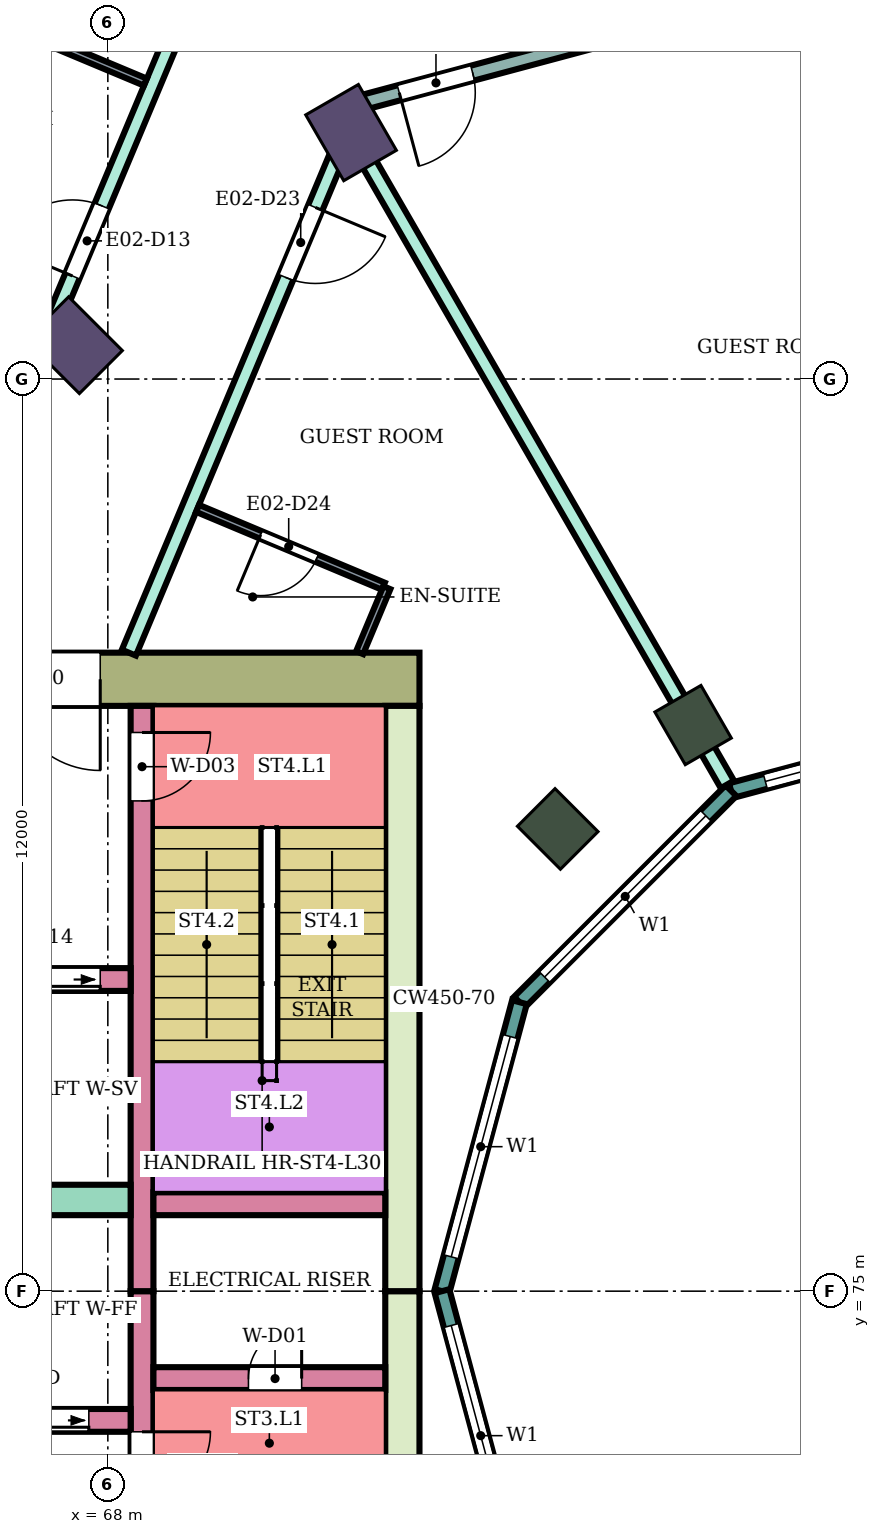
"""IFC4 building model, lengths in metres.
Left out: names, types, materials, properties, quantities, classifications, styles, units other than length and angle.
Written with IfcOpenShell. Run it as: python <this file> out.ifc"""

import sys

from ifc_helpers import new_model, si_unit, direction, frame, frame_2d, origin, origin_2d, place, context, subcontext, project, spatial, rectangle, extrude, element, fill, save


model = new_model("IFC4")
c1 = context("Model", 3, precision=1e-05, world=origin(), true_north=direction((0.0, 1.0)))
c2 = subcontext(c1, "Body", "Model", "MODEL_VIEW")
j1 = project(units=[si_unit("LENGTHUNIT", "METRE"), si_unit("PLANEANGLEUNIT", "RADIAN")], contexts=[c1])
p1 = place(None, origin())
s1 = spatial("IfcSite", under=j1, at=p1, CompositionType="ELEMENT")
p2 = place(p1, origin())
s2 = spatial("IfcBuilding", under=s1, at=p2, CompositionType="ELEMENT")
p3 = place(p2, frame((0.0, 0.0, 130.2)))
s3 = spatial("IfcBuildingStorey", under=s2, at=p3, CompositionType="ELEMENT", Elevation=130.2)
for number, where, z_axis, x_axis in (
    (1, (71.2, 90.242, 0.0), (0.0, 0.0, 1.0), (-0.5, 0.866, 0.0)),
    (2, (67.555, 87.445, 0.0), (0.0, 0.0, 1.0), (-0.707, 0.707, 0.0)),
):
    element("IfcColumn", number, at=place(p3, frame(where, z_axis=z_axis, x_axis=x_axis)), inside=s3, PredefinedType="COLUMN", context=c2, shape_type="SweptSolid", body=[
        extrude(rectangle(XDim=1.0, YDim=0.8, at=origin_2d()), origin(), (0.0, 0.0, 1.0), 3.9),
    ])
for number, where, z_axis, x_axis in (
    (3, (75.7, 82.448, 0.0), (0.0, 0.0, 1.0), (-0.5, 0.866, 0.0)),
    (4, (73.919, 81.081, 0.0), (0.0, 0.0, 1.0), (-0.707, 0.707, 0.0)),
):
    element("IfcColumn", number, at=place(p3, frame(where, z_axis=z_axis, x_axis=x_axis)), inside=s3, PredefinedType="COLUMN", context=c2, shape_type="SweptSolid", body=[
        extrude(rectangle(XDim=0.8, YDim=0.7, at=origin_2d()), origin(), (0.0, 0.0, 1.0), 3.9),
    ])
p4 = place(p3, frame((72.1, 83.05, 0.0), z_axis=(0.0, 0.0, 1.0), x_axis=(-1.0, 0.0, 0.0)))
e5 = element("IfcWall", 5, at=p4, inside=s3, PredefinedType="SHEAR", context=c2, shape_type="SweptSolid", body=[
    extrude(rectangle(XDim=14.8, YDim=0.7, at=frame_2d((7.4, 0.0))), origin(), (0.0, 0.0, 1.0), 3.58),
])
p5 = place(p4, frame((4.2, 0.0, 0.0)))
e6 = element("IfcOpeningElement", 6, at=p5, cuts=e5, PredefinedType="OPENING", context=c2, shape_type="SweptSolid", body=[
    extrude(rectangle(XDim=2.4, YDim=2.4, at=frame_2d((1.2, 1.2))), frame((0.0, 0.36, 0.0), z_axis=(0.0, -1.0, 0.0), x_axis=(1.0, 0.0, 0.0)), (0.0, 0.0, 1.0), 0.72),
])
for number, where, z_axis, x_axis in (
    (7, (71.875, 75.0, 0.0), (0.0, 0.0, 1.0), (0.0, -1.0, 0.0)),
    (8, (71.875, 82.7, 0.0), (0.0, 0.0, 1.0), (0.0, -1.0, 0.0)),
):
    element("IfcWall", number, at=place(p3, frame(where, z_axis=z_axis, x_axis=x_axis)), inside=s3, PredefinedType="SHEAR", context=c2, shape_type="SweptSolid", body=[
        extrude(rectangle(XDim=7.7, YDim=0.45, at=frame_2d((3.85, 0.0))), origin(), (0.0, 0.0, 1.0), 3.58),
    ])
p6 = place(p3, frame((68.45, 75.0, 0.0), z_axis=(0.0, 0.0, 1.0), x_axis=(0.0, -1.0, 0.0)))
e9 = element("IfcWall", 9, at=p6, inside=s3, PredefinedType="SHEAR", context=c2, shape_type="SweptSolid", body=[
    extrude(rectangle(XDim=7.7, YDim=0.3, at=frame_2d((3.85, 0.0))), origin(), (0.0, 0.0, 1.0), 3.58),
])
p7 = place(p6, frame((1.85, 0.0, 0.0)))
e10 = element("IfcOpeningElement", 10, at=p7, cuts=e9, PredefinedType="OPENING", context=c2, shape_type="SweptSolid", body=[
    extrude(rectangle(XDim=0.9, YDim=2.1, at=frame_2d((0.45, 1.05))), frame((0.0, 0.16, 0.0), z_axis=(0.0, -1.0, 0.0), x_axis=(1.0, 0.0, 0.0)), (0.0, 0.0, 1.0), 0.32),
])
p8 = place(p3, frame((68.45, 82.7, 0.0), z_axis=(0.0, 0.0, 1.0), x_axis=(0.0, -1.0, 0.0)))
e11 = element("IfcWall", 11, at=p8, inside=s3, PredefinedType="SHEAR", context=c2, shape_type="SweptSolid", body=[
    extrude(rectangle(XDim=7.7, YDim=0.3, at=frame_2d((3.85, 0.0))), origin(), (0.0, 0.0, 1.0), 3.58),
])
p9 = place(p8, frame((0.35, 0.0, 0.0)))
e12 = element("IfcOpeningElement", 12, at=p9, cuts=e11, PredefinedType="OPENING", context=c2, shape_type="SweptSolid", body=[
    extrude(rectangle(XDim=0.9, YDim=2.1, at=frame_2d((0.45, 1.05))), frame((0.0, 0.16, 0.0), z_axis=(0.0, -1.0, 0.0), x_axis=(1.0, 0.0, 0.0)), (0.0, 0.0, 1.0), 0.32),
])
p10 = place(p3, frame((71.65, 73.85, 0.0), z_axis=(0.0, 0.0, 1.0), x_axis=(-1.0, 0.0, 0.0)))
e13 = element("IfcWall", 13, at=p10, inside=s3, PredefinedType="SHEAR", context=c2, shape_type="SweptSolid", body=[
    extrude(rectangle(XDim=3.05, YDim=0.3, at=frame_2d((1.525, 0.0))), origin(), (0.0, 0.0, 1.0), 3.58),
])
p11 = place(p10, frame((1.1, 0.0, 0.0)))
e14 = element("IfcOpeningElement", 14, at=p11, cuts=e13, PredefinedType="OPENING", context=c2, shape_type="SweptSolid", body=[
    extrude(rectangle(XDim=0.7, YDim=2.0, at=frame_2d((0.35, 1.0))), frame((0.0, 0.16, 0.0), z_axis=(0.0, -1.0, 0.0), x_axis=(1.0, 0.0, 0.0)), (0.0, 0.0, 1.0), 0.32),
])
p12 = place(p3, frame((71.65, 76.15, 0.0), z_axis=(0.0, 0.0, 1.0), x_axis=(-1.0, 0.0, 0.0)))
e15 = element("IfcWall", 15, at=p12, inside=s3, PredefinedType="SHEAR", context=c2, shape_type="SweptSolid", body=[
    extrude(rectangle(XDim=3.05, YDim=0.3, at=frame_2d((1.525, 0.0))), origin(), (0.0, 0.0, 1.0), 3.58),
])
p13 = place(p3, frame((68.3, 73.3, 0.0), z_axis=(0.0, 0.0, 1.0), x_axis=(-1.0, 0.0, 0.0)))
e16 = element("IfcWall", 16, at=p13, inside=s3, PredefinedType="SHEAR", context=c2, shape_type="SweptSolid", body=[
    extrude(rectangle(XDim=11.0, YDim=0.3, at=frame_2d((5.5, 0.0))), origin(), (0.0, 0.0, 1.0), 3.58),
])
p14 = place(p13, frame((0.55, 0.0, 0.0)))
e17 = element("IfcOpeningElement", 17, at=p14, cuts=e16, PredefinedType="OPENING", context=c2, shape_type="SweptSolid", body=[
    extrude(rectangle(XDim=1.1, YDim=2.1, at=frame_2d((0.55, 1.05))), frame((0.0, 0.16, 0.0), z_axis=(0.0, -1.0, 0.0), x_axis=(1.0, 0.0, 0.0)), (0.0, 0.0, 1.0), 0.32),
])
p15 = place(p13, frame((8.1, 0.0, 0.0)))
e18 = element("IfcOpeningElement", 18, at=p15, cuts=e16, PredefinedType="OPENING", context=c2, shape_type="SweptSolid", body=[
    extrude(rectangle(XDim=1.0, YDim=2.1, at=frame_2d((0.5, 1.05))), frame((0.0, 0.16, 0.0), z_axis=(0.0, -1.0, 0.0), x_axis=(1.0, 0.0, 0.0)), (0.0, 0.0, 1.0), 0.32),
])
p16 = place(p3, frame((68.3, 76.2, 0.0), z_axis=(0.0, 0.0, 1.0), x_axis=(-1.0, 0.0, 0.0)))
e19 = element("IfcWall", 19, at=p16, inside=s3, PredefinedType="SHEAR", context=c2, shape_type="SweptSolid", body=[
    extrude(rectangle(XDim=11.0, YDim=0.4, at=frame_2d((5.5, 0.0))), origin(), (0.0, 0.0, 1.0), 3.58),
])
p17 = place(p3, frame((68.3, 79.1, 0.0), z_axis=(0.0, 0.0, 1.0), x_axis=(-1.0, 0.0, 0.0)))
e20 = element("IfcWall", 20, at=p17, inside=s3, PredefinedType="SHEAR", context=c2, shape_type="SweptSolid", body=[
    extrude(rectangle(XDim=11.0, YDim=0.3, at=frame_2d((5.5, 0.0))), origin(), (0.0, 0.0, 1.0), 3.58),
])
p18 = place(p17, frame((0.4, 0.0, 0.0)))
e21 = element("IfcOpeningElement", 21, at=p18, cuts=e20, PredefinedType="OPENING", context=c2, shape_type="SweptSolid", body=[
    extrude(rectangle(XDim=1.4, YDim=2.1, at=frame_2d((0.7, 1.05))), frame((0.0, 0.16, 0.0), z_axis=(0.0, -1.0, 0.0), x_axis=(1.0, 0.0, 0.0)), (0.0, 0.0, 1.0), 0.32),
])
p19 = place(p17, frame((5.4, 0.0, 0.0)))
e22 = element("IfcOpeningElement", 22, at=p19, cuts=e20, PredefinedType="OPENING", context=c2, shape_type="SweptSolid", body=[
    extrude(rectangle(XDim=1.4, YDim=2.1, at=frame_2d((0.7, 1.05))), frame((0.0, 0.16, 0.0), z_axis=(0.0, -1.0, 0.0), x_axis=(1.0, 0.0, 0.0)), (0.0, 0.0, 1.0), 0.32),
])
p20 = place(p17, frame((8.1, 0.0, 0.0)))
e23 = element("IfcOpeningElement", 23, at=p20, cuts=e20, PredefinedType="OPENING", context=c2, shape_type="SweptSolid", body=[
    extrude(rectangle(XDim=1.0, YDim=2.1, at=frame_2d((0.5, 1.05))), frame((0.0, 0.16, 0.0), z_axis=(0.0, -1.0, 0.0), x_axis=(1.0, 0.0, 0.0)), (0.0, 0.0, 1.0), 0.32),
])
p21 = place(p3, frame((80.0, 82.604, 0.0), z_axis=(0.0, 0.0, 1.0), x_axis=(-0.965933654434, -0.258789828301, 0.0)))
e24 = element("IfcWall", 24, at=p21, inside=s3, PredefinedType="NOTDEFINED", context=c2, shape_type="SweptSolid", body=[
    extrude(rectangle(XDim=3.936, YDim=0.2, at=frame_2d((1.968, 0.0))), origin(), (0.0, 0.0, 1.0), 3.9),
])
p22 = place(p21, frame((0.468, 0.0, 0.9)))
e25 = element("IfcOpeningElement", 25, at=p22, cuts=e24, PredefinedType="OPENING", context=c2, shape_type="SweptSolid", body=[
    extrude(rectangle(XDim=3.0, YDim=2.3, at=frame_2d((1.5, 1.15))), frame((0.0, 0.11, 0.0), z_axis=(0.0, -1.0, 0.0), x_axis=(1.0, 0.0, 0.0)), (0.0, 0.0, 1.0), 0.22),
])
p23 = place(p3, frame((76.198, 81.585, 0.0), z_axis=(0.0, 0.0, 1.0), x_axis=(-0.707106781187, -0.707106781187, 0.0)))
e26 = element("IfcWall", 26, at=p23, inside=s3, PredefinedType="NOTDEFINED", context=c2, shape_type="SweptSolid", body=[
    extrude(rectangle(XDim=3.936, YDim=0.2, at=frame_2d((1.968, 0.0))), origin(), (0.0, 0.0, 1.0), 3.9),
])
p24 = place(p23, frame((0.468, 0.0, 0.9)))
e27 = element("IfcOpeningElement", 27, at=p24, cuts=e26, PredefinedType="OPENING", context=c2, shape_type="SweptSolid", body=[
    extrude(rectangle(XDim=3.0, YDim=2.3, at=frame_2d((1.5, 1.15))), frame((0.0, 0.11, 0.0), z_axis=(0.0, -1.0, 0.0), x_axis=(1.0, 0.0, 0.0)), (0.0, 0.0, 1.0), 0.22),
])
p25 = place(p3, frame((73.415, 78.802, 0.0), z_axis=(0.0, 0.0, 1.0), x_axis=(-0.258789828301, -0.965933654434, 0.0)))
e28 = element("IfcWall", 28, at=p25, inside=s3, PredefinedType="NOTDEFINED", context=c2, shape_type="SweptSolid", body=[
    extrude(rectangle(XDim=3.936, YDim=0.2, at=frame_2d((1.968, 0.0))), origin(), (0.0, 0.0, 1.0), 3.9),
])
p26 = place(p25, frame((0.468, 0.0, 0.9)))
e29 = element("IfcOpeningElement", 29, at=p26, cuts=e28, PredefinedType="OPENING", context=c2, shape_type="SweptSolid", body=[
    extrude(rectangle(XDim=3.0, YDim=2.3, at=frame_2d((1.5, 1.15))), frame((0.0, 0.11, 0.0), z_axis=(0.0, -1.0, 0.0), x_axis=(1.0, 0.0, 0.0)), (0.0, 0.0, 1.0), 0.22),
])
p27 = place(p3, frame((72.396, 75.0, 0.0), z_axis=(0.0, 0.0, 1.0), x_axis=(0.258789828301, -0.965933654434, 0.0)))
e30 = element("IfcWall", 30, at=p27, inside=s3, PredefinedType="NOTDEFINED", context=c2, shape_type="SweptSolid", body=[
    extrude(rectangle(XDim=3.936, YDim=0.2, at=frame_2d((1.968, 0.0))), origin(), (0.0, 0.0, 1.0), 3.9),
])
p28 = place(p27, frame((0.468, 0.0, 0.9)))
e31 = element("IfcOpeningElement", 31, at=p28, cuts=e30, PredefinedType="OPENING", context=c2, shape_type="SweptSolid", body=[
    extrude(rectangle(XDim=3.0, YDim=2.3, at=frame_2d((1.5, 1.15))), frame((0.0, 0.11, 0.0), z_axis=(0.0, -1.0, 0.0), x_axis=(1.0, 0.0, 0.0)), (0.0, 0.0, 1.0), 0.22),
])
p29 = place(p3, frame((66.085, 84.9, 0.0), z_axis=(0.0, 0.0, 1.0), x_axis=(0.386617151403, 0.922240303956, 0.0)))
e32 = element("IfcWall", 32, at=p29, inside=s3, PredefinedType="PARTITIONING", context=c2, shape_type="SweptSolid", body=[
    extrude(rectangle(XDim=8.5, YDim=0.2, at=frame_2d((4.25, 0.0))), origin(), (0.0, 0.0, 1.0), 3.45),
])
p30 = place(p29, frame((3.748, 0.0, 0.0)))
e33 = element("IfcOpeningElement", 33, at=p30, cuts=e32, PredefinedType="OPENING", context=c2, shape_type="SweptSolid", body=[
    extrude(rectangle(XDim=1.0, YDim=2.1, at=frame_2d((0.5, 1.05))), frame((0.0, 0.11, 0.0), z_axis=(0.0, -1.0, 0.0), x_axis=(1.0, 0.0, 0.0)), (0.0, 0.0, 1.0), 0.22),
])
p31 = place(p3, frame((68.277, 83.4, 0.0), z_axis=(0.0, 0.0, 1.0), x_axis=(0.386454861164, 0.922308321703, 0.0)))
e34 = element("IfcWall", 34, at=p31, inside=s3, PredefinedType="PARTITIONING", context=c2, shape_type="SweptSolid", body=[
    extrude(rectangle(XDim=7.762, YDim=0.2, at=frame_2d((3.881, 0.0))), origin(), (0.0, 0.0, 1.0), 3.45),
])
p32 = place(p31, frame((5.351, 0.0, 0.0)))
e35 = element("IfcOpeningElement", 35, at=p32, cuts=e34, PredefinedType="OPENING", context=c2, shape_type="SweptSolid", body=[
    extrude(rectangle(XDim=1.0, YDim=2.1, at=frame_2d((0.5, 1.05))), frame((0.0, 0.11, 0.0), z_axis=(0.0, -1.0, 0.0), x_axis=(1.0, 0.0, 0.0)), (0.0, 0.0, 1.0), 0.22),
])
p33 = place(p3, frame((71.263, 90.135, 0.0), z_axis=(0.0, 0.0, 1.0), x_axis=(0.499869438034, -0.86610077065, 0.0)))
e36 = element("IfcWall", 36, at=p33, inside=s3, PredefinedType="PARTITIONING", context=c2, shape_type="SweptSolid", body=[
    extrude(rectangle(XDim=9.777, YDim=0.2, at=frame_2d((4.889, 0.0))), origin(), (0.0, 0.0, 1.0), 3.45),
])
p34 = place(p3, frame((71.303, 90.625, 0.0), z_axis=(0.0, 0.0, 1.0), x_axis=(0.965971868307, 0.258647152776, 0.0)))
e37 = element("IfcWall", 37, at=p34, inside=s3, PredefinedType="PARTITIONING", context=c2, shape_type="SweptSolid", body=[
    extrude(rectangle(XDim=8.874, YDim=0.2, at=frame_2d((4.437, 0.0))), origin(), (0.0, 0.0, 1.0), 3.08),
])
p35 = place(p34, frame((0.55, 0.0, 0.0)))
e38 = element("IfcOpeningElement", 38, at=p35, cuts=e37, PredefinedType="OPENING", context=c2, shape_type="SweptSolid", body=[
    extrude(rectangle(XDim=1.0, YDim=2.1, at=frame_2d((0.5, 1.05))), frame((0.0, 0.11, 0.0), z_axis=(0.0, -1.0, 0.0), x_axis=(1.0, 0.0, 0.0)), (0.0, 0.0, 1.0), 0.22),
])
p36 = place(p3, frame((66.049, 91.931, 0.0), z_axis=(0.0, 0.0, 1.0), x_axis=(0.922344808264, -0.38636777126, 0.0)))
e39 = element("IfcWall", 39, at=p36, inside=s3, PredefinedType="PARTITIONING", context=c2, shape_type="SweptSolid", body=[
    extrude(rectangle(XDim=2.65, YDim=0.1, at=frame_2d((1.325, 0.0))), origin(), (0.0, 0.0, 1.0), 3.45),
])
p37 = place(p3, frame((69.181, 85.298, 0.0), z_axis=(0.0, 0.0, 1.0), x_axis=(0.922377635784, -0.38628939541, 0.0)))
e40 = element("IfcWall", 40, at=p37, inside=s3, PredefinedType="PARTITIONING", context=c2, shape_type="SweptSolid", body=[
    extrude(rectangle(XDim=2.65, YDim=0.1, at=frame_2d((1.325, 0.0))), origin(), (0.0, 0.0, 1.0), 3.45),
])
p38 = place(p37, frame((0.9, 0.0, 0.0)))
e41 = element("IfcOpeningElement", 41, at=p38, cuts=e40, PredefinedType="OPENING", context=c2, shape_type="SweptSolid", body=[
    extrude(rectangle(XDim=0.8, YDim=2.1, at=frame_2d((0.4, 1.05))), frame((0.0, 0.06, 0.0), z_axis=(0.0, -1.0, 0.0), x_axis=(1.0, 0.0, 0.0)), (0.0, 0.0, 1.0), 0.12),
])
p39 = place(p3, frame((71.313, 83.4, 0.0), z_axis=(0.0, 0.0, 1.0), x_axis=(0.386148512695, 0.922436624459, 0.0)))
e42 = element("IfcWall", 42, at=p39, inside=s3, PredefinedType="PARTITIONING", context=c2, shape_type="SweptSolid", body=[
    extrude(rectangle(XDim=0.927, YDim=0.1, at=frame_2d((0.463, 0.0))), origin(), (0.0, 0.0, 1.0), 3.45),
])
p40 = place(p22, origin())
e43 = element("IfcWindow", 43, at=p40, inside=s3, PartitioningType="SINGLE_PANEL", PredefinedType="WINDOW", context=c2, shape_type="SweptSolid", body=[
    extrude(rectangle(XDim=3.0, YDim=2.3, at=frame_2d((1.5, 1.15))), frame((0.0, 0.03, 0.0), z_axis=(0.0, -1.0, 0.0), x_axis=(1.0, 0.0, 0.0)), (0.0, 0.0, 1.0), 0.06),
])
fill(e25, e43)
p41 = place(p24, origin())
e44 = element("IfcWindow", 44, at=p41, inside=s3, PartitioningType="SINGLE_PANEL", PredefinedType="WINDOW", context=c2, shape_type="SweptSolid", body=[
    extrude(rectangle(XDim=3.0, YDim=2.3, at=frame_2d((1.5, 1.15))), frame((0.0, 0.03, 0.0), z_axis=(0.0, -1.0, 0.0), x_axis=(1.0, 0.0, 0.0)), (0.0, 0.0, 1.0), 0.06),
])
fill(e27, e44)
p42 = place(p26, origin())
e45 = element("IfcWindow", 45, at=p42, inside=s3, PartitioningType="SINGLE_PANEL", PredefinedType="WINDOW", context=c2, shape_type="SweptSolid", body=[
    extrude(rectangle(XDim=3.0, YDim=2.3, at=frame_2d((1.5, 1.15))), frame((0.0, 0.03, 0.0), z_axis=(0.0, -1.0, 0.0), x_axis=(1.0, 0.0, 0.0)), (0.0, 0.0, 1.0), 0.06),
])
fill(e29, e45)
p43 = place(p28, origin())
e46 = element("IfcWindow", 46, at=p43, inside=s3, PartitioningType="SINGLE_PANEL", PredefinedType="WINDOW", context=c2, shape_type="SweptSolid", body=[
    extrude(rectangle(XDim=3.0, YDim=2.3, at=frame_2d((1.5, 1.15))), frame((0.0, 0.03, 0.0), z_axis=(0.0, -1.0, 0.0), x_axis=(1.0, 0.0, 0.0)), (0.0, 0.0, 1.0), 0.06),
])
fill(e31, e46)
p44 = place(p30, origin())
e47 = element("IfcDoor", 47, at=p44, inside=s3, OperationType="SINGLE_SWING_LEFT", PredefinedType="DOOR", context=c2, shape_type="SweptSolid", body=[
    extrude(rectangle(XDim=1.0, YDim=2.1, at=frame_2d((0.5, 1.05))), frame((0.0, 0.025, 0.0), z_axis=(0.0, -1.0, 0.0), x_axis=(1.0, 0.0, 0.0)), (0.0, 0.0, 1.0), 0.05),
])
fill(e33, e47)
p45 = place(p35, frame((1.0, 0.0, 0.0), z_axis=(0.0, 0.0, 1.0), x_axis=(-1.0, 0.0, 0.0)))
e48 = element("IfcDoor", 48, at=p45, inside=s3, OperationType="SINGLE_SWING_RIGHT", PredefinedType="DOOR", context=c2, shape_type="SweptSolid", body=[
    extrude(rectangle(XDim=1.0, YDim=2.1, at=frame_2d((0.5, 1.05))), frame((0.0, 0.025, 0.0), z_axis=(0.0, -1.0, 0.0), x_axis=(1.0, 0.0, 0.0)), (0.0, 0.0, 1.0), 0.05),
])
fill(e38, e48)
p46 = place(p32, frame((1.0, 0.0, 0.0), z_axis=(0.0, 0.0, 1.0), x_axis=(-1.0, 0.0, 0.0)))
e49 = element("IfcDoor", 49, at=p46, inside=s3, OperationType="SINGLE_SWING_LEFT", PredefinedType="DOOR", context=c2, shape_type="SweptSolid", body=[
    extrude(rectangle(XDim=1.0, YDim=2.1, at=frame_2d((0.5, 1.05))), frame((0.0, 0.025, 0.0), z_axis=(0.0, -1.0, 0.0), x_axis=(1.0, 0.0, 0.0)), (0.0, 0.0, 1.0), 0.05),
])
fill(e35, e49)
p47 = place(p38, frame((0.8, 0.0, 0.0), z_axis=(0.0, 0.0, 1.0), x_axis=(-1.0, 0.0, 0.0)))
e50 = element("IfcDoor", 50, at=p47, inside=s3, OperationType="SINGLE_SWING_RIGHT", PredefinedType="DOOR", context=c2, shape_type="SweptSolid", body=[
    extrude(rectangle(XDim=0.8, YDim=2.1, at=frame_2d((0.4, 1.05))), frame((0.0, 0.025, 0.0), z_axis=(0.0, -1.0, 0.0), x_axis=(1.0, 0.0, 0.0)), (0.0, 0.0, 1.0), 0.05),
])
fill(e41, e50)
p48 = place(p11, frame((0.7, 0.0, 0.0), z_axis=(0.0, 0.0, 1.0), x_axis=(-1.0, 0.0, 0.0)))
e51 = element("IfcDoor", 51, at=p48, inside=s3, OperationType="SINGLE_SWING_RIGHT", PredefinedType="DOOR", context=c2, shape_type="SweptSolid", body=[
    extrude(rectangle(XDim=0.7, YDim=2.0, at=frame_2d((0.35, 1.0))), frame((0.0, 0.025, 0.0), z_axis=(0.0, -1.0, 0.0), x_axis=(1.0, 0.0, 0.0)), (0.0, 0.0, 1.0), 0.05),
])
fill(e14, e51)
p49 = place(p7, origin())
e52 = element("IfcDoor", 52, at=p49, inside=s3, OperationType="SINGLE_SWING_LEFT", PredefinedType="DOOR", context=c2, shape_type="SweptSolid", body=[
    extrude(rectangle(XDim=0.9, YDim=2.1, at=frame_2d((0.45, 1.05))), frame((0.0, 0.025, 0.0), z_axis=(0.0, -1.0, 0.0), x_axis=(1.0, 0.0, 0.0)), (0.0, 0.0, 1.0), 0.05),
])
fill(e10, e52)
p50 = place(p9, origin())
e53 = element("IfcDoor", 53, at=p50, inside=s3, OperationType="SINGLE_SWING_LEFT", PredefinedType="DOOR", context=c2, shape_type="SweptSolid", body=[
    extrude(rectangle(XDim=0.9, YDim=2.1, at=frame_2d((0.45, 1.05))), frame((0.0, 0.025, 0.0), z_axis=(0.0, -1.0, 0.0), x_axis=(1.0, 0.0, 0.0)), (0.0, 0.0, 1.0), 0.05),
])
fill(e12, e53)
p51 = place(p14, origin())
e54 = element("IfcDoor", 54, at=p51, inside=s3, OperationType="DOUBLE_DOOR_SLIDING", PredefinedType="DOOR", context=c2, shape_type="SweptSolid", body=[
    extrude(rectangle(XDim=1.1, YDim=2.1, at=frame_2d((0.55, 1.05))), frame((0.0, 0.025, 0.0), z_axis=(0.0, -1.0, 0.0), x_axis=(1.0, 0.0, 0.0)), (0.0, 0.0, 1.0), 0.05),
])
fill(e17, e54)
p52 = place(p18, origin())
e55 = element("IfcDoor", 55, at=p52, inside=s3, OperationType="DOUBLE_DOOR_SLIDING", PredefinedType="DOOR", context=c2, shape_type="SweptSolid", body=[
    extrude(rectangle(XDim=1.4, YDim=2.1, at=frame_2d((0.7, 1.05))), frame((0.0, 0.025, 0.0), z_axis=(0.0, -1.0, 0.0), x_axis=(1.0, 0.0, 0.0)), (0.0, 0.0, 1.0), 0.05),
])
fill(e21, e55)
p53 = place(p5, origin())
e56 = element("IfcDoor", 56, at=p53, inside=s3, OperationType="DOUBLE_DOOR_SINGLE_SWING", PredefinedType="DOOR", context=c2, shape_type="SweptSolid", body=[
    extrude(rectangle(XDim=2.4, YDim=2.4, at=frame_2d((1.2, 1.2))), frame((0.0, 0.025, 0.0), z_axis=(0.0, -1.0, 0.0), x_axis=(1.0, 0.0, 0.0)), (0.0, 0.0, 1.0), 0.05),
])
fill(e6, e56)
save(model, sys.argv[1])
